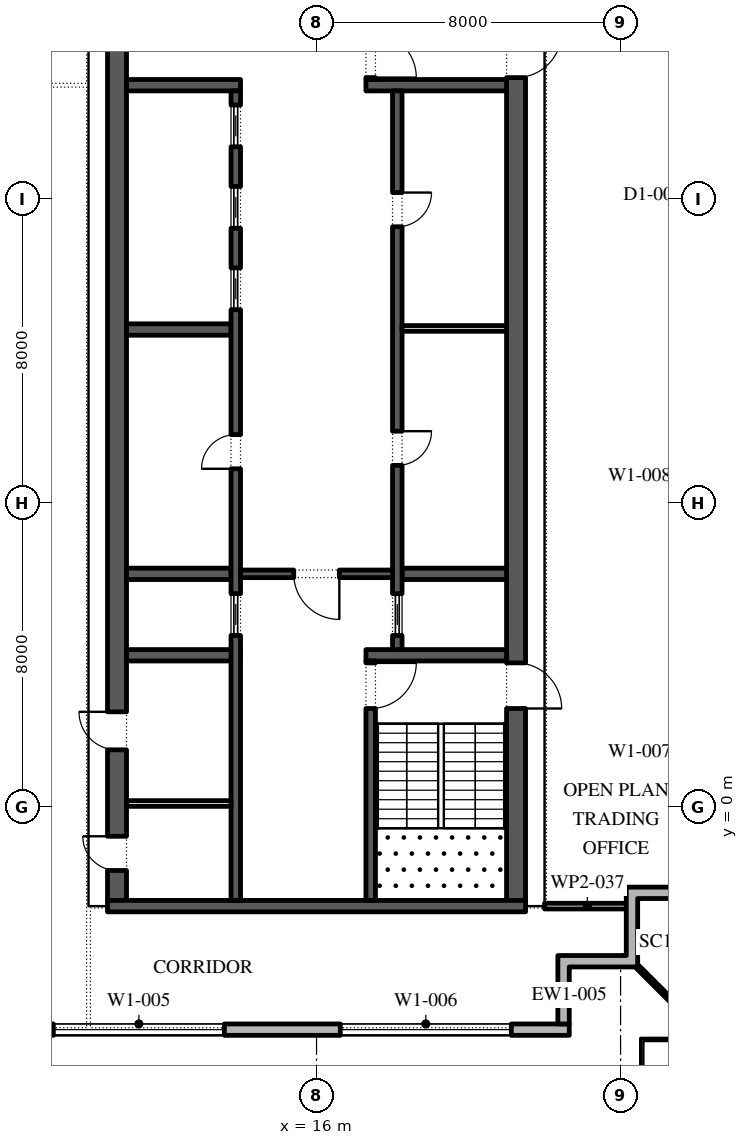
"""IFC4 building model, lengths in metres.
Left out: names, types, materials, properties, quantities, classifications, styles, units other than length and angle.
Written with IfcOpenShell. Run it as: python <this file> out.ifc"""

import sys

from ifc_helpers import new_model, si_unit, direction, frame, frame_2d, origin, place, context, subcontext, project, spatial, polyline, rectangle, outline, extrude, element, fill, save


model = new_model("IFC4")
c1 = context("Model", 3, precision=1e-05, world=origin(), true_north=direction((0.0, 1.0)))
c2 = subcontext(c1, "Body", "Model", "MODEL_VIEW")
j1 = project(units=[si_unit("LENGTHUNIT", "METRE"), si_unit("PLANEANGLEUNIT", "RADIAN")], contexts=[c1])
p1 = place(None, origin())
s1 = spatial("IfcSite", under=j1, at=p1, CompositionType="ELEMENT")
p2 = place(p1, origin())
s2 = spatial("IfcBuilding", under=s1, at=p2, CompositionType="ELEMENT")
p3 = place(p2, frame((0.0, 0.0, 351.0)))
s3 = spatial("IfcBuildingStorey", under=s2, at=p3, CompositionType="ELEMENT", Elevation=351.0)
p4 = place(p3, frame((-22.35, -5.85, 0.0), z_axis=(0.0, 0.0, 1.0), x_axis=(1.0, 0.0, 0.0)))
e1 = element("IfcWall", 1, at=p4, inside=s3, PredefinedType="STANDARD", context=c2, shape_type="SweptSolid", body=[
    extrude(rectangle(XDim=45.0, YDim=0.3, at=frame_2d((22.5, 0.0))), origin(), (0.0, 0.0, 1.0), 4.0),
])
p5 = place(p4, frame((1.375, 0.0, 0.45)))
e2 = element("IfcOpeningElement", 2, at=p5, cuts=e1, PredefinedType="OPENING", context=c2, shape_type="SweptSolid", body=[
    extrude(rectangle(XDim=4.5, YDim=3.05, at=frame_2d((2.25, 1.525))), frame((0.0, 0.16, 0.0), z_axis=(0.0, -1.0, 0.0), x_axis=(1.0, 0.0, 0.0)), (0.0, 0.0, 1.0), 0.32),
])
p6 = place(p4, frame((8.775, 0.0, 0.45)))
e3 = element("IfcOpeningElement", 3, at=p6, cuts=e1, PredefinedType="OPENING", context=c2, shape_type="SweptSolid", body=[
    extrude(rectangle(XDim=4.5, YDim=3.05, at=frame_2d((2.25, 1.525))), frame((0.0, 0.16, 0.0), z_axis=(0.0, -1.0, 0.0), x_axis=(1.0, 0.0, 0.0)), (0.0, 0.0, 1.0), 0.32),
])
p7 = place(p4, frame((17.375, 0.0, 0.0)))
e4 = element("IfcOpeningElement", 4, at=p7, cuts=e1, PredefinedType="OPENING", context=c2, shape_type="SweptSolid", body=[
    extrude(rectangle(XDim=2.4, YDim=3.5, at=frame_2d((1.2, 1.75))), frame((0.0, 0.16, 0.0), z_axis=(0.0, -1.0, 0.0), x_axis=(1.0, 0.0, 0.0)), (0.0, 0.0, 1.0), 0.32),
])
p8 = place(p4, frame((23.875, 0.0, 0.45)))
e5 = element("IfcOpeningElement", 5, at=p8, cuts=e1, PredefinedType="OPENING", context=c2, shape_type="SweptSolid", body=[
    extrude(rectangle(XDim=4.5, YDim=3.05, at=frame_2d((2.25, 1.525))), frame((0.0, 0.16, 0.0), z_axis=(0.0, -1.0, 0.0), x_axis=(1.0, 0.0, 0.0)), (0.0, 0.0, 1.0), 0.32),
])
p9 = place(p4, frame((31.425, 0.0, 0.45)))
e6 = element("IfcOpeningElement", 6, at=p9, cuts=e1, PredefinedType="OPENING", context=c2, shape_type="SweptSolid", body=[
    extrude(rectangle(XDim=4.5, YDim=3.05, at=frame_2d((2.25, 1.525))), frame((0.0, 0.16, 0.0), z_axis=(0.0, -1.0, 0.0), x_axis=(1.0, 0.0, 0.0)), (0.0, 0.0, 1.0), 0.32),
])
p10 = place(p4, frame((38.975, 0.0, 0.45)))
e7 = element("IfcOpeningElement", 7, at=p10, cuts=e1, PredefinedType="OPENING", context=c2, shape_type="SweptSolid", body=[
    extrude(rectangle(XDim=4.5, YDim=3.05, at=frame_2d((2.25, 1.525))), frame((0.0, 0.16, 0.0), z_axis=(0.0, -1.0, 0.0), x_axis=(1.0, 0.0, 0.0)), (0.0, 0.0, 1.0), 0.32),
])
p11 = place(p3, origin())
e8 = element("IfcWall", 8, at=p11, inside=s3, PredefinedType="STANDARD", context=c2, shape_type="SweptSolid", body=[
    extrude(outline(polyline([(24.15, -3.9), (24.15, -2.1), (26.25, -2.1), (26.25, -2.4), (24.45, -2.4), (24.45, -4.2), (22.65, -4.2), (22.65, -5.7), (22.35, -5.7), (22.35, -3.9), (24.15, -3.9)])), origin(), (0.0, 0.0, 1.0), 4.0),
])
p12 = place(p3, frame((24.45, -4.2, -0.05), z_axis=(0.0, 0.0, 1.0), x_axis=(0.707106781187, -0.707106781187, 0.0)))
e9 = element("IfcWall", 9, at=p12, inside=s3, PredefinedType="STANDARD", context=c2, shape_type="SweptSolid", body=[
    extrude(rectangle(XDim=2.667, YDim=0.1, at=frame_2d((1.333, 0.0))), origin(), (0.0, 0.0, 1.0), 4.05),
])
p13 = place(p3, frame((21.25, -2.45, 0.0), z_axis=(0.0, 0.0, 1.0), x_axis=(0.0, 1.0, 0.0)))
e10 = element("IfcWall", 10, at=p13, inside=s3, PredefinedType="SHEAR", context=c2, shape_type="SweptSolid", body=[
    extrude(rectangle(XDim=27.9, YDim=0.5, at=frame_2d((13.95, 0.0))), origin(), (0.0, 0.0, 1.0), 4.0),
])
p14 = place(p13, frame((5.05, 0.0, 0.0)))
e11 = element("IfcOpeningElement", 11, at=p14, cuts=e10, PredefinedType="OPENING", context=c2, shape_type="SweptSolid", body=[
    extrude(rectangle(XDim=1.2, YDim=2.1, at=frame_2d((0.6, 1.05))), frame((0.0, 0.26, 0.0), z_axis=(0.0, -1.0, 0.0), x_axis=(1.0, 0.0, 0.0)), (0.0, 0.0, 1.0), 0.52),
])
p15 = place(p13, frame((21.65, 0.0, 0.0)))
e12 = element("IfcOpeningElement", 12, at=p15, cuts=e10, PredefinedType="OPENING", context=c2, shape_type="SweptSolid", body=[
    extrude(rectangle(XDim=1.2, YDim=2.1, at=frame_2d((0.6, 1.05))), frame((0.0, 0.26, 0.0), z_axis=(0.0, -1.0, 0.0), x_axis=(1.0, 0.0, 0.0)), (0.0, 0.0, 1.0), 0.52),
])
p16 = place(p3, frame((10.75, -2.45, 0.0), z_axis=(0.0, 0.0, 1.0), x_axis=(0.0, 1.0, 0.0)))
e13 = element("IfcWall", 13, at=p16, inside=s3, PredefinedType="SHEAR", context=c2, shape_type="SweptSolid", body=[
    extrude(rectangle(XDim=27.9, YDim=0.5, at=frame_2d((13.95, 0.0))), origin(), (0.0, 0.0, 1.0), 4.0),
])
p17 = place(p16, frame((23.65, 0.0, 0.0)))
e14 = element("IfcOpeningElement", 14, at=p17, cuts=e13, PredefinedType="OPENING", context=c2, shape_type="SweptSolid", body=[
    extrude(rectangle(XDim=2.4, YDim=2.1, at=frame_2d((1.2, 1.05))), frame((0.0, 0.26, 0.0), z_axis=(0.0, -1.0, 0.0), x_axis=(1.0, 0.0, 0.0)), (0.0, 0.0, 1.0), 0.52),
])
p18 = place(p16, frame((0.788, 0.0, 0.0)))
e15 = element("IfcOpeningElement", 15, at=p18, cuts=e13, PredefinedType="OPENING", context=c2, shape_type="SweptSolid", body=[
    extrude(rectangle(XDim=0.9, YDim=2.1, at=frame_2d((0.45, 1.05))), frame((0.0, 0.26, 0.0), z_axis=(0.0, -1.0, 0.0), x_axis=(1.0, 0.0, 0.0)), (0.0, 0.0, 1.0), 0.52),
])
p19 = place(p16, frame((3.962, 0.0, 0.0)))
e16 = element("IfcOpeningElement", 16, at=p19, cuts=e13, PredefinedType="OPENING", context=c2, shape_type="SweptSolid", body=[
    extrude(rectangle(XDim=1.0, YDim=2.1, at=frame_2d((0.5, 1.05))), frame((0.0, 0.26, 0.0), z_axis=(0.0, -1.0, 0.0), x_axis=(1.0, 0.0, 0.0)), (0.0, 0.0, 1.0), 0.52),
])
p20 = place(p3, frame((10.5, -2.6, 0.0), z_axis=(0.0, 0.0, 1.0), x_axis=(1.0, 0.0, 0.0)))
e17 = element("IfcWall", 17, at=p20, inside=s3, PredefinedType="SHEAR", context=c2, shape_type="SweptSolid", body=[
    extrude(rectangle(XDim=11.0, YDim=0.3, at=frame_2d((5.5, 0.0))), origin(), (0.0, 0.0, 1.0), 4.0),
])
p21 = place(p3, frame((17.3, 4.0, 0.0), z_axis=(0.0, 0.0, 1.0), x_axis=(1.0, 0.0, 0.0)))
e18 = element("IfcWall", 18, at=p21, inside=s3, PredefinedType="SHEAR", context=c2, shape_type="SweptSolid", body=[
    extrude(rectangle(XDim=3.7, YDim=0.3, at=frame_2d((1.85, 0.0))), origin(), (0.0, 0.0, 1.0), 4.0),
])
p22 = place(p3, frame((17.425, -2.45, 0.0), z_axis=(0.0, 0.0, 1.0), x_axis=(0.0, 1.0, 0.0)))
e19 = element("IfcWall", 19, at=p22, inside=s3, PredefinedType="SHEAR", context=c2, shape_type="SweptSolid", body=[
    extrude(rectangle(XDim=6.3, YDim=0.25, at=frame_2d((3.15, 0.0))), origin(), (0.0, 0.0, 1.0), 4.0),
])
p23 = place(p22, frame((5.05, 0.0, 0.0)))
e20 = element("IfcOpeningElement", 20, at=p23, cuts=e19, PredefinedType="OPENING", context=c2, shape_type="SweptSolid", body=[
    extrude(rectangle(XDim=1.2, YDim=2.1, at=frame_2d((0.6, 1.05))), frame((0.0, 0.135, 0.0), z_axis=(0.0, -1.0, 0.0), x_axis=(1.0, 0.0, 0.0)), (0.0, 0.0, 1.0), 0.27),
])
p24 = place(p3, frame((17.3, 19.0, 0.0), z_axis=(0.0, 0.0, 1.0), x_axis=(1.0, 0.0, 0.0)))
e21 = element("IfcWall", 21, at=p24, inside=s3, PredefinedType="SHEAR", context=c2, shape_type="SweptSolid", body=[
    extrude(rectangle(XDim=3.7, YDim=0.3, at=frame_2d((1.85, 0.0))), origin(), (0.0, 0.0, 1.0), 4.0),
])
p25 = place(p3, frame((17.425, 19.15, 0.0), z_axis=(0.0, 0.0, 1.0), x_axis=(0.0, 1.0, 0.0)))
e22 = element("IfcWall", 22, at=p25, inside=s3, PredefinedType="SHEAR", context=c2, shape_type="SweptSolid", body=[
    extrude(rectangle(XDim=6.3, YDim=0.25, at=frame_2d((3.15, 0.0))), origin(), (0.0, 0.0, 1.0), 4.0),
])
p26 = place(p25, frame((0.05, 0.0, 0.0)))
e23 = element("IfcOpeningElement", 23, at=p26, cuts=e22, PredefinedType="OPENING", context=c2, shape_type="SweptSolid", body=[
    extrude(rectangle(XDim=1.2, YDim=2.1, at=frame_2d((0.6, 1.05))), frame((0.0, 0.135, 0.0), z_axis=(0.0, -1.0, 0.0), x_axis=(1.0, 0.0, 0.0)), (0.0, 0.0, 1.0), 0.27),
])
p27 = place(p3, frame((18.25, 6.143, 0.0), z_axis=(0.0, 0.0, 1.0), x_axis=(1.0, 0.0, 0.0)))
e24 = element("IfcWall", 24, at=p27, inside=s3, PredefinedType="SHEAR", context=c2, shape_type="SweptSolid", body=[
    extrude(rectangle(XDim=2.75, YDim=0.3, at=frame_2d((1.375, 0.0))), origin(), (0.0, 0.0, 1.0), 4.0),
])
p28 = place(p3, frame((18.125, 4.15, 0.0), z_axis=(0.0, 0.0, 1.0), x_axis=(0.0, 1.0, 0.0)))
e25 = element("IfcWall", 25, at=p28, inside=s3, PredefinedType="SHEAR", context=c2, shape_type="SweptSolid", body=[
    extrude(rectangle(XDim=14.7, YDim=0.25, at=frame_2d((7.35, 0.0))), origin(), (0.0, 0.0, 1.0), 4.0),
])
p29 = place(p28, frame((4.846, 0.0, 0.0)))
e26 = element("IfcOpeningElement", 26, at=p29, cuts=e25, PredefinedType="OPENING", context=c2, shape_type="SweptSolid", body=[
    extrude(rectangle(XDim=0.9, YDim=2.1, at=frame_2d((0.45, 1.05))), frame((0.0, 0.135, 0.0), z_axis=(0.0, -1.0, 0.0), x_axis=(1.0, 0.0, 0.0)), (0.0, 0.0, 1.0), 0.27),
])
p30 = place(p28, frame((11.125, 0.0, 0.0)))
e27 = element("IfcOpeningElement", 27, at=p30, cuts=e25, PredefinedType="OPENING", context=c2, shape_type="SweptSolid", body=[
    extrude(rectangle(XDim=0.9, YDim=2.1, at=frame_2d((0.45, 1.05))), frame((0.0, 0.135, 0.0), z_axis=(0.0, -1.0, 0.0), x_axis=(1.0, 0.0, 0.0)), (0.0, 0.0, 1.0), 0.27),
])
p31 = place(p28, frame((0.371, 0.0, 0.0)))
e28 = element("IfcOpeningElement", 28, at=p31, cuts=e25, PredefinedType="OPENING", context=c2, shape_type="SweptSolid", body=[
    extrude(rectangle(XDim=1.1, YDim=2.1, at=frame_2d((0.55, 1.05))), frame((0.0, 0.135, 0.0), z_axis=(0.0, -1.0, 0.0), x_axis=(1.0, 0.0, 0.0)), (0.0, 0.0, 1.0), 0.27),
])
p32 = place(p3, frame((18.25, 12.6, 0.0), z_axis=(0.0, 0.0, 1.0), x_axis=(1.0, 0.0, 0.0)))
e29 = element("IfcWall", 29, at=p32, inside=s3, PredefinedType="PARTITIONING", context=c2, shape_type="SweptSolid", body=[
    extrude(rectangle(XDim=2.75, YDim=0.15, at=frame_2d((1.375, 0.0))), origin(), (0.0, 0.0, 1.0), 4.0),
])
p33 = place(p3, frame((11.0, 4.0, 0.0), z_axis=(0.0, 0.0, 1.0), x_axis=(1.0, 0.0, 0.0)))
e30 = element("IfcWall", 30, at=p33, inside=s3, PredefinedType="SHEAR", context=c2, shape_type="SweptSolid", body=[
    extrude(rectangle(XDim=3.0, YDim=0.3, at=frame_2d((1.5, 0.0))), origin(), (0.0, 0.0, 1.0), 4.0),
])
for number, where, z_axis, x_axis in (
    (31, (11.0, 6.143, 0.0), (0.0, 0.0, 1.0), (1.0, 0.0, 0.0)),
    (32, (11.0, 12.571, 0.0), (0.0, 0.0, 1.0), (1.0, 0.0, 0.0)),
):
    element("IfcWall", number, at=place(p3, frame(where, z_axis=z_axis, x_axis=x_axis)), inside=s3, PredefinedType="SHEAR", context=c2, shape_type="SweptSolid", body=[
        extrude(rectangle(XDim=2.75, YDim=0.3, at=frame_2d((1.375, 0.0))), origin(), (0.0, 0.0, 1.0), 4.0),
    ])
p34 = place(p3, frame((11.0, 19.0, 0.0), z_axis=(0.0, 0.0, 1.0), x_axis=(1.0, 0.0, 0.0)))
e33 = element("IfcWall", 33, at=p34, inside=s3, PredefinedType="SHEAR", context=c2, shape_type="SweptSolid", body=[
    extrude(rectangle(XDim=3.0, YDim=0.3, at=frame_2d((1.5, 0.0))), origin(), (0.0, 0.0, 1.0), 4.0),
])
p35 = place(p3, frame((13.875, -2.45, 0.0), z_axis=(0.0, 0.0, 1.0), x_axis=(0.0, 1.0, 0.0)))
e34 = element("IfcWall", 34, at=p35, inside=s3, PredefinedType="SHEAR", context=c2, shape_type="SweptSolid", body=[
    extrude(rectangle(XDim=21.3, YDim=0.25, at=frame_2d((10.65, 0.0))), origin(), (0.0, 0.0, 1.0), 4.0),
])
p36 = place(p35, frame((11.357, 0.0, 0.0)))
e35 = element("IfcOpeningElement", 35, at=p36, cuts=e34, PredefinedType="OPENING", context=c2, shape_type="SweptSolid", body=[
    extrude(rectangle(XDim=0.9, YDim=2.1, at=frame_2d((0.45, 1.05))), frame((0.0, 0.135, 0.0), z_axis=(0.0, -1.0, 0.0), x_axis=(1.0, 0.0, 0.0)), (0.0, 0.0, 1.0), 0.27),
])
p37 = place(p35, frame((6.971, 0.0, 0.0)))
e36 = element("IfcOpeningElement", 36, at=p37, cuts=e34, PredefinedType="OPENING", context=c2, shape_type="SweptSolid", body=[
    extrude(rectangle(XDim=1.1, YDim=2.1, at=frame_2d((0.55, 1.05))), frame((0.0, 0.135, 0.0), z_axis=(0.0, -1.0, 0.0), x_axis=(1.0, 0.0, 0.0)), (0.0, 0.0, 1.0), 0.27),
])
p38 = place(p35, frame((15.543, 0.0, 0.0)))
e37 = element("IfcOpeningElement", 37, at=p38, cuts=e34, PredefinedType="OPENING", context=c2, shape_type="SweptSolid", body=[
    extrude(rectangle(XDim=1.1, YDim=2.1, at=frame_2d((0.55, 1.05))), frame((0.0, 0.135, 0.0), z_axis=(0.0, -1.0, 0.0), x_axis=(1.0, 0.0, 0.0)), (0.0, 0.0, 1.0), 0.27),
])
p39 = place(p35, frame((17.686, 0.0, 0.0)))
e38 = element("IfcOpeningElement", 38, at=p39, cuts=e34, PredefinedType="OPENING", context=c2, shape_type="SweptSolid", body=[
    extrude(rectangle(XDim=1.1, YDim=2.1, at=frame_2d((0.55, 1.05))), frame((0.0, 0.135, 0.0), z_axis=(0.0, -1.0, 0.0), x_axis=(1.0, 0.0, 0.0)), (0.0, 0.0, 1.0), 0.27),
])
p40 = place(p35, frame((19.829, 0.0, 0.0)))
e39 = element("IfcOpeningElement", 39, at=p40, cuts=e34, PredefinedType="OPENING", context=c2, shape_type="SweptSolid", body=[
    extrude(rectangle(XDim=1.1, YDim=2.1, at=frame_2d((0.55, 1.05))), frame((0.0, 0.135, 0.0), z_axis=(0.0, -1.0, 0.0), x_axis=(1.0, 0.0, 0.0)), (0.0, 0.0, 1.0), 0.27),
])
p41 = place(p3, frame((14.0, 6.143, 0.0), z_axis=(0.0, 0.0, 1.0), x_axis=(1.0, 0.0, 0.0)))
e40 = element("IfcWall", 40, at=p41, inside=s3, PredefinedType="SHEAR", context=c2, shape_type="SweptSolid", body=[
    extrude(rectangle(XDim=4.0, YDim=0.2, at=frame_2d((2.0, 0.0))), origin(), (0.0, 0.0, 1.0), 4.0),
])
p42 = place(p41, frame((1.4, 0.0, 0.0)))
e41 = element("IfcOpeningElement", 41, at=p42, cuts=e40, PredefinedType="OPENING", context=c2, shape_type="SweptSolid", body=[
    extrude(rectangle(XDim=1.2, YDim=2.1, at=frame_2d((0.6, 1.05))), frame((0.0, 0.11, 0.0), z_axis=(0.0, -1.0, 0.0), x_axis=(1.0, 0.0, 0.0)), (0.0, 0.0, 1.0), 0.22),
])
p43 = place(p3, frame((11.0, 0.1, 0.0), z_axis=(0.0, 0.0, 1.0), x_axis=(1.0, 0.0, 0.0)))
e42 = element("IfcWall", 42, at=p43, inside=s3, PredefinedType="PARTITIONING", context=c2, shape_type="SweptSolid", body=[
    extrude(rectangle(XDim=2.75, YDim=0.15, at=frame_2d((1.375, 0.0))), origin(), (0.0, 0.0, 1.0), 4.0),
])
p44 = place(p3, frame((22.0, -2.6, 0.0), z_axis=(0.0, 0.0, 1.0), x_axis=(1.0, 0.0, 0.0)))
e43 = element("IfcWall", 43, at=p44, inside=s3, PredefinedType="PARTITIONING", context=c2, shape_type="SweptSolid", body=[
    extrude(rectangle(XDim=2.25, YDim=0.15, at=frame_2d((1.125, 0.0))), origin(), (0.0, 0.0, 1.0), 4.0),
])
p45 = place(p9, origin())
e44 = element("IfcWindow", 44, at=p45, inside=s3, PartitioningType="DOUBLE_PANEL_VERTICAL", PredefinedType="WINDOW", context=c2, shape_type="SweptSolid", body=[
    extrude(rectangle(XDim=4.5, YDim=3.05, at=frame_2d((2.25, 1.525))), frame((0.0, 0.03, 0.0), z_axis=(0.0, -1.0, 0.0), x_axis=(1.0, 0.0, 0.0)), (0.0, 0.0, 1.0), 0.06),
])
fill(e6, e44)
p46 = place(p10, origin())
e45 = element("IfcWindow", 45, at=p46, inside=s3, PartitioningType="DOUBLE_PANEL_VERTICAL", PredefinedType="WINDOW", context=c2, shape_type="SweptSolid", body=[
    extrude(rectangle(XDim=4.5, YDim=3.05, at=frame_2d((2.25, 1.525))), frame((0.0, 0.03, 0.0), z_axis=(0.0, -1.0, 0.0), x_axis=(1.0, 0.0, 0.0)), (0.0, 0.0, 1.0), 0.06),
])
fill(e7, e45)
p47 = place(p29, frame((0.9, -0.2, 0.0), z_axis=(0.0, 0.0, 1.0), x_axis=(-1.0, 0.0, 0.0)))
e46 = element("IfcDoor", 46, at=p47, inside=s3, OperationType="SINGLE_SWING_RIGHT", PredefinedType="DOOR", context=c2, shape_type="SweptSolid", body=[
    extrude(rectangle(XDim=0.9, YDim=2.1, at=frame_2d((0.45, 1.05))), frame((0.0, -0.075, 0.0), z_axis=(0.0, -1.0, 0.0), x_axis=(1.0, 0.0, 0.0)), (0.0, 0.0, 1.0), 0.05),
])
fill(e26, e46)
p48 = place(p30, frame((0.9, -0.2, 0.0), z_axis=(0.0, 0.0, 1.0), x_axis=(-1.0, 0.0, 0.0)))
e47 = element("IfcDoor", 47, at=p48, inside=s3, OperationType="SINGLE_SWING_RIGHT", PredefinedType="DOOR", context=c2, shape_type="SweptSolid", body=[
    extrude(rectangle(XDim=0.9, YDim=2.1, at=frame_2d((0.45, 1.05))), frame((0.0, -0.075, 0.0), z_axis=(0.0, -1.0, 0.0), x_axis=(1.0, 0.0, 0.0)), (0.0, 0.0, 1.0), 0.05),
])
fill(e27, e47)
p49 = place(p31, origin())
e48 = element("IfcDoor", 48, at=p49, inside=s3, OperationType="SLIDING_TO_LEFT", PredefinedType="DOOR", context=c2, shape_type="SweptSolid", body=[
    extrude(rectangle(XDim=1.1, YDim=2.1, at=frame_2d((0.55, 1.05))), frame((0.0, 0.025, 0.0), z_axis=(0.0, -1.0, 0.0), x_axis=(1.0, 0.0, 0.0)), (0.0, 0.0, 1.0), 0.05),
])
fill(e28, e48)
p50 = place(p36, origin())
e49 = element("IfcDoor", 49, at=p50, inside=s3, OperationType="SINGLE_SWING_RIGHT", PredefinedType="DOOR", context=c2, shape_type="SweptSolid", body=[
    extrude(rectangle(XDim=0.9, YDim=2.1, at=frame_2d((0.45, 1.05))), frame((0.0, 0.125, 0.0), z_axis=(0.0, -1.0, 0.0), x_axis=(1.0, 0.0, 0.0)), (0.0, 0.0, 1.0), 0.05),
])
fill(e35, e49)
p51 = place(p37, origin())
e50 = element("IfcDoor", 50, at=p51, inside=s3, OperationType="SLIDING_TO_LEFT", PredefinedType="DOOR", context=c2, shape_type="SweptSolid", body=[
    extrude(rectangle(XDim=1.1, YDim=2.1, at=frame_2d((0.55, 1.05))), frame((0.0, 0.025, 0.0), z_axis=(0.0, -1.0, 0.0), x_axis=(1.0, 0.0, 0.0)), (0.0, 0.0, 1.0), 0.05),
])
fill(e36, e50)
p52 = place(p38, origin())
e51 = element("IfcDoor", 51, at=p52, inside=s3, OperationType="SLIDING_TO_LEFT", PredefinedType="DOOR", context=c2, shape_type="SweptSolid", body=[
    extrude(rectangle(XDim=1.1, YDim=2.1, at=frame_2d((0.55, 1.05))), frame((0.0, 0.025, 0.0), z_axis=(0.0, -1.0, 0.0), x_axis=(1.0, 0.0, 0.0)), (0.0, 0.0, 1.0), 0.05),
])
fill(e37, e51)
p53 = place(p39, origin())
e52 = element("IfcDoor", 52, at=p53, inside=s3, OperationType="SLIDING_TO_LEFT", PredefinedType="DOOR", context=c2, shape_type="SweptSolid", body=[
    extrude(rectangle(XDim=1.1, YDim=2.1, at=frame_2d((0.55, 1.05))), frame((0.0, 0.025, 0.0), z_axis=(0.0, -1.0, 0.0), x_axis=(1.0, 0.0, 0.0)), (0.0, 0.0, 1.0), 0.05),
])
fill(e38, e52)
p54 = place(p40, origin())
e53 = element("IfcDoor", 53, at=p54, inside=s3, OperationType="SLIDING_TO_LEFT", PredefinedType="DOOR", context=c2, shape_type="SweptSolid", body=[
    extrude(rectangle(XDim=1.1, YDim=2.1, at=frame_2d((0.55, 1.05))), frame((0.0, 0.025, 0.0), z_axis=(0.0, -1.0, 0.0), x_axis=(1.0, 0.0, 0.0)), (0.0, 0.0, 1.0), 0.05),
])
fill(e39, e53)
p55 = place(p42, frame((1.2, 0.0, 0.0), z_axis=(0.0, 0.0, 1.0), x_axis=(-1.0, 0.0, 0.0)))
e54 = element("IfcDoor", 54, at=p55, inside=s3, OperationType="SINGLE_SWING_RIGHT", PredefinedType="DOOR", context=c2, shape_type="SweptSolid", body=[
    extrude(rectangle(XDim=1.2, YDim=2.1, at=frame_2d((0.6, 1.05))), frame((0.0, 0.025, 0.0), z_axis=(0.0, -1.0, 0.0), x_axis=(1.0, 0.0, 0.0)), (0.0, 0.0, 1.0), 0.05),
])
fill(e41, e54)
p56 = place(p23, frame((1.2, 0.0, 0.0), z_axis=(0.0, 0.0, 1.0), x_axis=(-1.0, 0.0, 0.0)))
e55 = element("IfcDoor", 55, at=p56, inside=s3, OperationType="SINGLE_SWING_RIGHT", PredefinedType="DOOR", context=c2, shape_type="SweptSolid", body=[
    extrude(rectangle(XDim=1.2, YDim=2.1, at=frame_2d((0.6, 1.05))), frame((0.0, 0.025, 0.0), z_axis=(0.0, -1.0, 0.0), x_axis=(1.0, 0.0, 0.0)), (0.0, 0.0, 1.0), 0.05),
])
fill(e20, e55)
p57 = place(p14, frame((1.2, 0.0, 0.0), z_axis=(0.0, 0.0, 1.0), x_axis=(-1.0, 0.0, 0.0)))
e56 = element("IfcDoor", 56, at=p57, inside=s3, OperationType="SINGLE_SWING_LEFT", PredefinedType="DOOR", context=c2, shape_type="SweptSolid", body=[
    extrude(rectangle(XDim=1.2, YDim=2.1, at=frame_2d((0.6, 1.05))), frame((0.0, 0.025, 0.0), z_axis=(0.0, -1.0, 0.0), x_axis=(1.0, 0.0, 0.0)), (0.0, 0.0, 1.0), 0.05),
])
fill(e11, e56)
p58 = place(p26, frame((1.2, 0.0, 0.0), z_axis=(0.0, 0.0, 1.0), x_axis=(-1.0, 0.0, 0.0)))
e57 = element("IfcDoor", 57, at=p58, inside=s3, OperationType="SINGLE_SWING_LEFT", PredefinedType="DOOR", context=c2, shape_type="SweptSolid", body=[
    extrude(rectangle(XDim=1.2, YDim=2.1, at=frame_2d((0.6, 1.05))), frame((0.0, 0.025, 0.0), z_axis=(0.0, -1.0, 0.0), x_axis=(1.0, 0.0, 0.0)), (0.0, 0.0, 1.0), 0.05),
])
fill(e23, e57)
p59 = place(p15, frame((1.2, 0.0, 0.0), z_axis=(0.0, 0.0, 1.0), x_axis=(-1.0, 0.0, 0.0)))
e58 = element("IfcDoor", 58, at=p59, inside=s3, OperationType="SINGLE_SWING_RIGHT", PredefinedType="DOOR", context=c2, shape_type="SweptSolid", body=[
    extrude(rectangle(XDim=1.2, YDim=2.1, at=frame_2d((0.6, 1.05))), frame((0.0, 0.025, 0.0), z_axis=(0.0, -1.0, 0.0), x_axis=(1.0, 0.0, 0.0)), (0.0, 0.0, 1.0), 0.05),
])
fill(e12, e58)
p60 = place(p18, origin())
e59 = element("IfcDoor", 59, at=p60, inside=s3, OperationType="SINGLE_SWING_LEFT", PredefinedType="DOOR", context=c2, shape_type="SweptSolid", body=[
    extrude(rectangle(XDim=0.9, YDim=2.1, at=frame_2d((0.45, 1.05))), frame((0.0, -0.2, 0.0), z_axis=(0.0, -1.0, 0.0), x_axis=(1.0, 0.0, 0.0)), (0.0, 0.0, 1.0), 0.05),
])
fill(e15, e59)
p61 = place(p19, origin())
e60 = element("IfcDoor", 60, at=p61, inside=s3, OperationType="SINGLE_SWING_LEFT", PredefinedType="DOOR", context=c2, shape_type="SweptSolid", body=[
    extrude(rectangle(XDim=1.0, YDim=2.1, at=frame_2d((0.5, 1.05))), frame((0.0, -0.2, 0.0), z_axis=(0.0, -1.0, 0.0), x_axis=(1.0, 0.0, 0.0)), (0.0, 0.0, 1.0), 0.05),
])
fill(e16, e60)
save(model, sys.argv[1])
